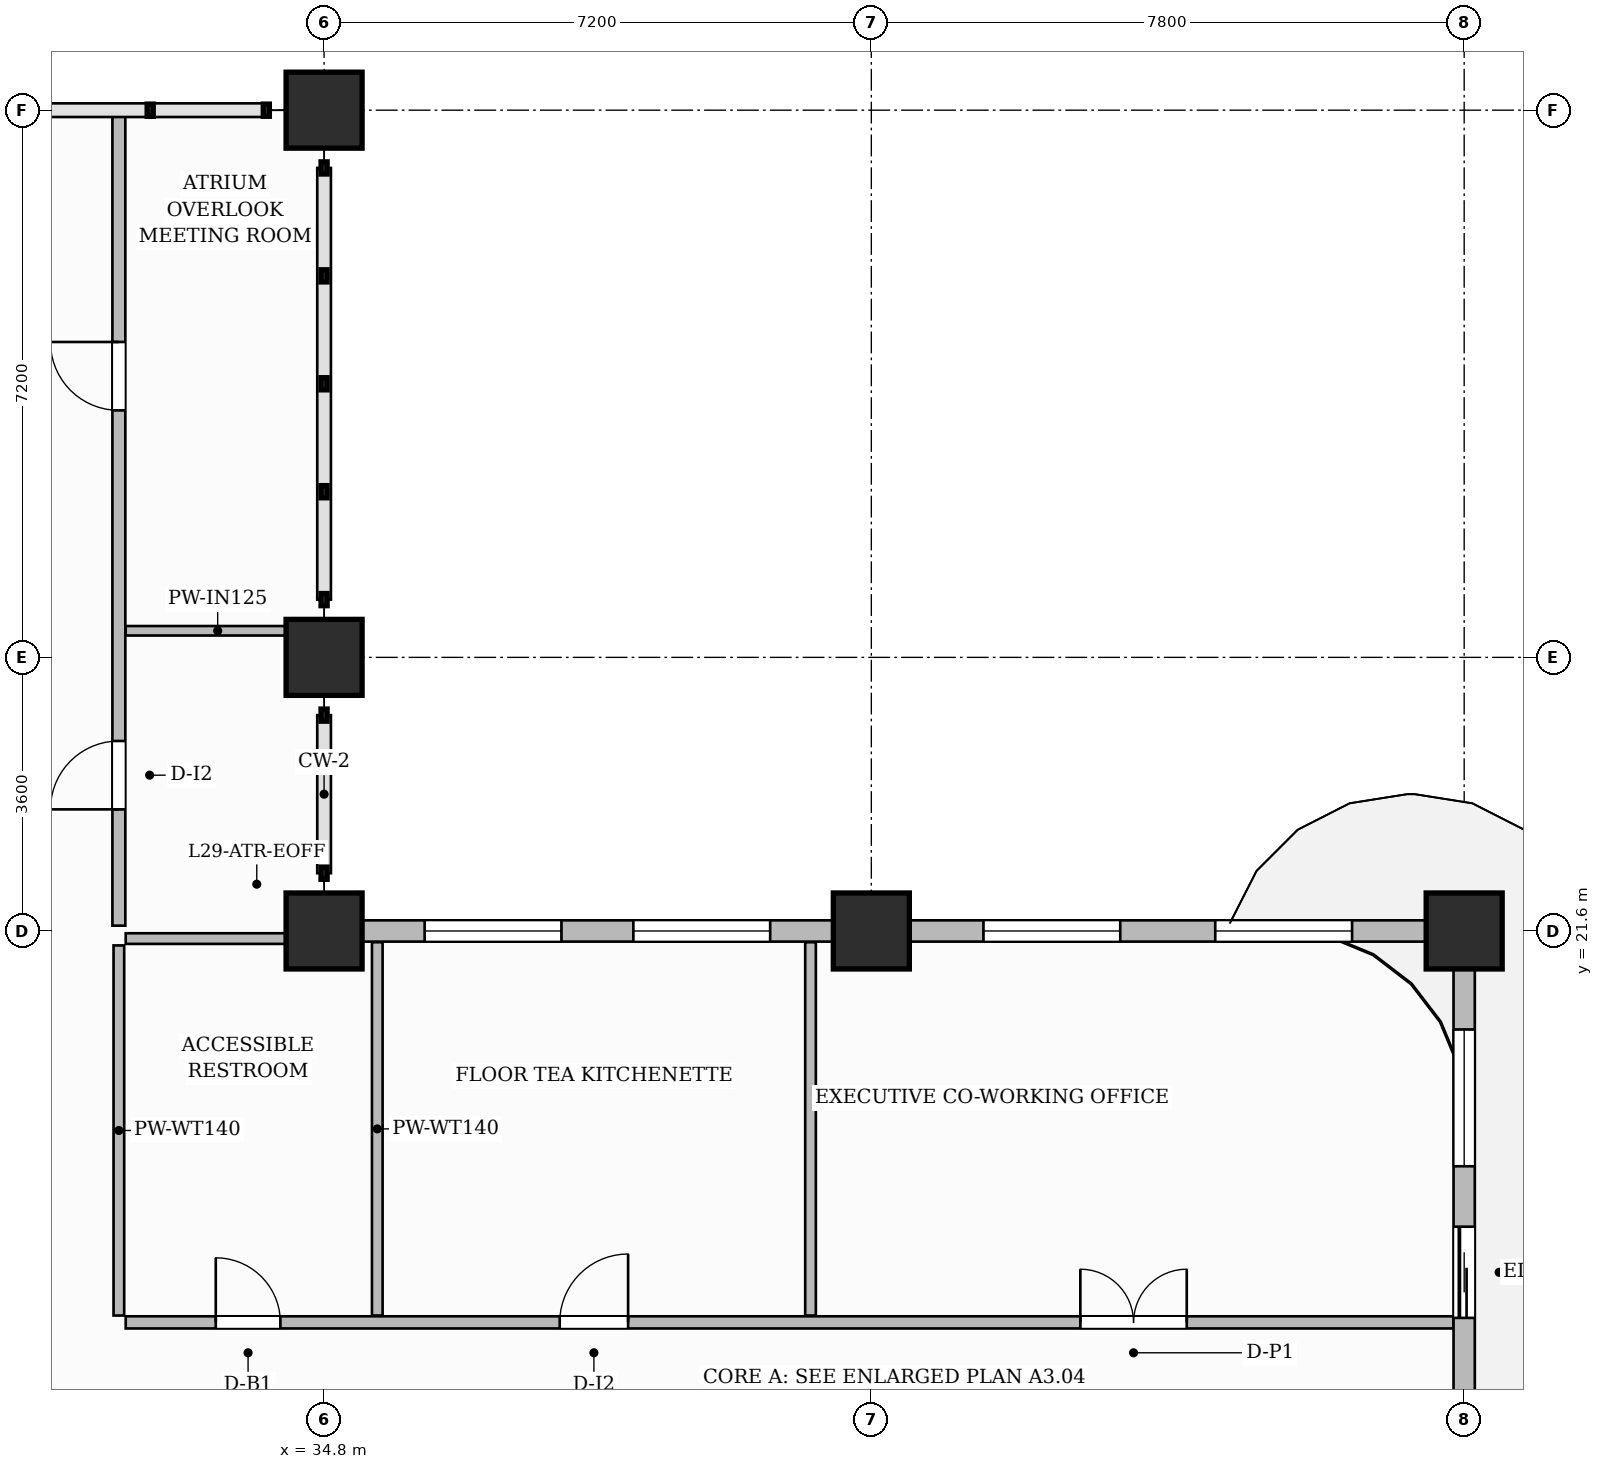
"""IFC4 building model, lengths in metres.
Left out: names, types, materials, properties, quantities, classifications, styles, units other than length and angle.
Written with IfcOpenShell. Run it as: python <this file> out.ifc"""

import sys

from ifc_helpers import new_model, si_unit, direction, frame, frame_2d, origin, origin_2d, place, context, subcontext, project, spatial, rectangle, extrude, source, transform, mapped, element, fill, save


model = new_model("IFC4")
c1 = context("Model", 3, precision=1e-05, world=origin(), true_north=direction((0.0, 1.0)))
c2 = subcontext(c1, "Body", "Model", "MODEL_VIEW")
j1 = project(units=[si_unit("LENGTHUNIT", "METRE"), si_unit("PLANEANGLEUNIT", "RADIAN")], contexts=[c1])
p1 = place(None, origin())
s1 = spatial("IfcSite", under=j1, at=p1, CompositionType="ELEMENT")
p2 = place(p1, origin())
s2 = spatial("IfcBuilding", under=s1, at=p2, CompositionType="ELEMENT")
p3 = place(p2, frame((0.0, 0.0, 119.2)))
s3 = spatial("IfcBuildingStorey", under=s2, at=p3, CompositionType="ELEMENT", Elevation=119.2)
m1 = source(origin(), c2, "Body", "SweptSolid", [
    extrude(rectangle(XDim=1.0, YDim=1.0, at=origin_2d()), origin(), (0.0, 0.0, 1.0), 3.7),
])
for number, where, z_axis, x_axis in (
    (1, (34.8, 21.6, 0.0), (0.0, 0.0, 1.0), (1.0, 0.0, 0.0)),
    (2, (34.8, 25.2, 0.0), (0.0, 0.0, 1.0), (1.0, 0.0, 0.0)),
    (3, (34.8, 32.4, 0.0), (0.0, 0.0, 1.0), (1.0, 0.0, 0.0)),
    (4, (42.0, 21.6, 0.0), (0.0, 0.0, 1.0), (1.0, 0.0, 0.0)),
    (5, (49.8, 21.6, 0.0), (0.0, 0.0, 1.0), (1.0, 0.0, 0.0)),
):
    element("IfcColumn", number, at=place(p3, frame(where, z_axis=z_axis, x_axis=x_axis)), inside=s3, PredefinedType="COLUMN", context=c2, shape_type="MappedRepresentation", body=[
        mapped(m1, transform((0.0, 0.0, 0.0), scale=1.0)),
    ])
p4 = place(p3, frame((32.19, 16.45, 0.0), z_axis=(0.0, 0.0, 1.0), x_axis=(1.0, 0.0, 0.0)))
e6 = element("IfcWall", 6, at=p4, inside=s3, PredefinedType="PARTITIONING", context=c2, shape_type="SweptSolid", body=[
    extrude(rectangle(XDim=17.47, YDim=0.16, at=frame_2d((8.735, 0.0))), origin(), (0.0, 0.0, 1.0), 3.45),
])
p5 = place(p4, frame((1.185, 0.0, 0.0)))
e7 = element("IfcOpeningElement", 7, at=p5, cuts=e6, PredefinedType="OPENING", context=c2, shape_type="SweptSolid", body=[
    extrude(rectangle(XDim=0.85, YDim=2.1, at=frame_2d((0.425, 1.05))), frame((0.0, 0.09, 0.0), z_axis=(0.0, -1.0, 0.0), x_axis=(1.0, 0.0, 0.0)), (0.0, 0.0, 1.0), 0.18),
])
p6 = place(p4, frame((5.71, 0.0, 0.0)))
e8 = element("IfcOpeningElement", 8, at=p6, cuts=e6, PredefinedType="OPENING", context=c2, shape_type="SweptSolid", body=[
    extrude(rectangle(XDim=0.9, YDim=2.15, at=frame_2d((0.45, 1.075))), frame((0.0, 0.09, 0.0), z_axis=(0.0, -1.0, 0.0), x_axis=(1.0, 0.0, 0.0)), (0.0, 0.0, 1.0), 0.18),
])
p7 = place(p4, frame((12.56, 0.0, 0.0)))
e9 = element("IfcOpeningElement", 9, at=p7, cuts=e6, PredefinedType="OPENING", context=c2, shape_type="SweptSolid", body=[
    extrude(rectangle(XDim=1.4, YDim=2.35, at=frame_2d((0.7, 1.175))), frame((0.0, 0.09, 0.0), z_axis=(0.0, -1.0, 0.0), x_axis=(1.0, 0.0, 0.0)), (0.0, 0.0, 1.0), 0.18),
])
p8 = place(p3, frame((32.1, 16.54, 0.0), z_axis=(0.0, 0.0, 1.0), x_axis=(0.0, 1.0, 0.0)))
e10 = element("IfcWall", 10, at=p8, inside=s3, PredefinedType="PARTITIONING", context=c2, shape_type="SweptSolid", body=[
    extrude(rectangle(XDim=4.87, YDim=0.14, at=frame_2d((2.435, 0.0))), origin(), (0.0, 0.0, 1.0), 3.45),
])
for number, where, z_axis, x_axis in (
    (11, (35.5, 16.54, 0.0), (0.0, 0.0, 1.0), (0.0, 1.0, 0.0)),
    (12, (41.2, 16.54, 0.0), (0.0, 0.0, 1.0), (0.0, 1.0, 0.0)),
):
    element("IfcWall", number, at=place(p3, frame(where, z_axis=z_axis, x_axis=x_axis)), inside=s3, PredefinedType="PARTITIONING", context=c2, shape_type="SweptSolid", body=[
        extrude(rectangle(XDim=4.912, YDim=0.14, at=frame_2d((2.456, 0.0))), origin(), (0.0, 0.0, 1.0), 3.45),
    ])
p9 = place(p3, frame((32.19, 21.5, 0.0), z_axis=(0.0, 0.0, 1.0), x_axis=(1.0, 0.0, 0.0)))
e13 = element("IfcWall", 13, at=p9, inside=s3, PredefinedType="PARTITIONING", context=c2, shape_type="SweptSolid", body=[
    extrude(rectangle(XDim=2.42, YDim=0.14, at=frame_2d((1.21, 0.0))), origin(), (0.0, 0.0, 1.0), 2.935),
])
p10 = place(p3, frame((32.1, 21.67, 0.0), z_axis=(0.0, 0.0, 1.0), x_axis=(0.0, 1.0, 0.0)))
e14 = element("IfcWall", 14, at=p10, inside=s3, PredefinedType="PARTITIONING", context=c2, shape_type="SweptSolid", body=[
    extrude(rectangle(XDim=10.702, YDim=0.17, at=frame_2d((5.351, 0.0))), origin(), (0.0, 0.0, 1.0), 3.45),
])
p11 = place(p10, frame((1.53, 0.0, 0.0)))
e15 = element("IfcOpeningElement", 15, at=p11, cuts=e14, PredefinedType="OPENING", context=c2, shape_type="SweptSolid", body=[
    extrude(rectangle(XDim=0.9, YDim=2.15, at=frame_2d((0.45, 1.075))), frame((0.0, 0.095, 0.0), z_axis=(0.0, -1.0, 0.0), x_axis=(1.0, 0.0, 0.0)), (0.0, 0.0, 1.0), 0.19),
])
p12 = place(p10, frame((6.78, 0.0, 0.0)))
e16 = element("IfcOpeningElement", 16, at=p12, cuts=e14, PredefinedType="OPENING", context=c2, shape_type="SweptSolid", body=[
    extrude(rectangle(XDim=0.9, YDim=2.15, at=frame_2d((0.45, 1.075))), frame((0.0, 0.095, 0.0), z_axis=(0.0, -1.0, 0.0), x_axis=(1.0, 0.0, 0.0)), (0.0, 0.0, 1.0), 0.19),
])
p13 = place(p3, frame((32.19, 25.55, 0.0), z_axis=(0.0, 0.0, 1.0), x_axis=(1.0, 0.0, 0.0)))
e17 = element("IfcWall", 17, at=p13, inside=s3, PredefinedType="PARTITIONING", context=c2, shape_type="SweptSolid", body=[
    extrude(rectangle(XDim=2.42, YDim=0.125, at=frame_2d((1.21, 0.0))), origin(), (0.0, 0.0, 1.0), 3.45),
])
p14 = place(p3, frame((49.8, 14.62, 0.0), z_axis=(0.0, 0.0, 1.0), x_axis=(0.0, 1.0, 0.0)))
e18 = element("IfcWall", 18, at=p14, inside=s3, PredefinedType="SOLIDWALL", context=c2, shape_type="SweptSolid", body=[
    extrude(rectangle(XDim=6.93, YDim=0.28, at=frame_2d((3.465, 0.0))), origin(), (0.0, 0.0, 1.0), 2.935),
])
p15 = place(p14, frame((1.889, 0.0, 0.0)))
e19 = element("IfcOpeningElement", 19, at=p15, cuts=e18, PredefinedType="OPENING", context=c2, shape_type="SweptSolid", body=[
    extrude(rectangle(XDim=1.2, YDim=2.2, at=frame_2d((0.6, 1.1))), frame((0.0, 0.15, 0.0), z_axis=(0.0, -1.0, 0.0), x_axis=(1.0, 0.0, 0.0)), (0.0, 0.0, 1.0), 0.3),
])
p16 = place(p14, frame((3.884, 0.0, 0.8)))
e20 = element("IfcOpeningElement", 20, at=p16, cuts=e18, PredefinedType="OPENING", context=c2, shape_type="SweptSolid", body=[
    extrude(rectangle(XDim=1.8, YDim=1.85, at=frame_2d((0.9, 0.925))), frame((0.0, 0.15, 0.0), z_axis=(0.0, -1.0, 0.0), x_axis=(1.0, 0.0, 0.0)), (0.0, 0.0, 1.0), 0.3),
])
p17 = place(p3, frame((34.8, 21.6, 0.0), z_axis=(0.0, 0.0, 1.0), x_axis=(1.0, 0.0, 0.0)))
e21 = element("IfcWall", 21, at=p17, inside=s3, PredefinedType="SOLIDWALL", context=c2, shape_type="SweptSolid", body=[
    extrude(rectangle(XDim=15.0, YDim=0.28, at=frame_2d((7.5, 0.0))), origin(), (0.0, 0.0, 1.0), 2.935),
])
p18 = place(p17, frame((1.323, 0.0, 0.8)))
e22 = element("IfcOpeningElement", 22, at=p18, cuts=e21, PredefinedType="OPENING", context=c2, shape_type="SweptSolid", body=[
    extrude(rectangle(XDim=1.8, YDim=1.85, at=frame_2d((0.9, 0.925))), frame((0.0, 0.15, 0.0), z_axis=(0.0, -1.0, 0.0), x_axis=(1.0, 0.0, 0.0)), (0.0, 0.0, 1.0), 0.3),
])
p19 = place(p17, frame((4.069, 0.0, 0.8)))
e23 = element("IfcOpeningElement", 23, at=p19, cuts=e21, PredefinedType="OPENING", context=c2, shape_type="SweptSolid", body=[
    extrude(rectangle(XDim=1.8, YDim=1.85, at=frame_2d((0.9, 0.925))), frame((0.0, 0.15, 0.0), z_axis=(0.0, -1.0, 0.0), x_axis=(1.0, 0.0, 0.0)), (0.0, 0.0, 1.0), 0.3),
])
p20 = place(p17, frame((8.675, 0.0, 0.8)))
e24 = element("IfcOpeningElement", 24, at=p20, cuts=e21, PredefinedType="OPENING", context=c2, shape_type="SweptSolid", body=[
    extrude(rectangle(XDim=1.8, YDim=1.85, at=frame_2d((0.9, 0.925))), frame((0.0, 0.15, 0.0), z_axis=(0.0, -1.0, 0.0), x_axis=(1.0, 0.0, 0.0)), (0.0, 0.0, 1.0), 0.3),
])
p21 = place(p17, frame((11.725, 0.0, 0.8)))
e25 = element("IfcOpeningElement", 25, at=p21, cuts=e21, PredefinedType="OPENING", context=c2, shape_type="SweptSolid", body=[
    extrude(rectangle(XDim=1.8, YDim=1.85, at=frame_2d((0.9, 0.925))), frame((0.0, 0.15, 0.0), z_axis=(0.0, -1.0, 0.0), x_axis=(1.0, 0.0, 0.0)), (0.0, 0.0, 1.0), 0.3),
])
m2 = source(origin(), c2, "Body", "SweptSolid", [
    extrude(rectangle(XDim=0.85, YDim=2.1, at=frame_2d((0.425, 1.05))), frame((0.0, 0.025, 0.0), z_axis=(0.0, -1.0, 0.0), x_axis=(1.0, 0.0, 0.0)), (0.0, 0.0, 1.0), 0.05),
])
p22 = place(p5, origin())
e26 = element("IfcDoor", 26, at=p22, inside=s3, OperationType="SINGLE_SWING_LEFT", PredefinedType="DOOR", context=c2, shape_type="MappedRepresentation", body=[
    mapped(m2, transform((0.0, 0.0, 0.0), scale=1.0)),
])
fill(e7, e26)
m3 = source(origin(), c2, "Body", "SweptSolid", [
    extrude(rectangle(XDim=0.9, YDim=2.15, at=frame_2d((0.45, 1.075))), frame((0.0, 0.025, 0.0), z_axis=(0.0, -1.0, 0.0), x_axis=(1.0, 0.0, 0.0)), (0.0, 0.0, 1.0), 0.05),
])
p23 = place(p6, origin())
e27 = element("IfcDoor", 27, at=p23, inside=s3, OperationType="SINGLE_SWING_RIGHT", PredefinedType="DOOR", context=c2, shape_type="MappedRepresentation", body=[
    mapped(m3, transform((0.0, 0.0, 0.0), scale=1.0)),
])
fill(e8, e27)
m4 = source(origin(), c2, "Body", "SweptSolid", [
    extrude(rectangle(XDim=1.4, YDim=2.35, at=frame_2d((0.7, 1.175))), frame((0.0, 0.025, 0.0), z_axis=(0.0, -1.0, 0.0), x_axis=(1.0, 0.0, 0.0)), (0.0, 0.0, 1.0), 0.05),
])
p24 = place(p7, origin())
e28 = element("IfcDoor", 28, at=p24, inside=s3, OperationType="DOUBLE_DOOR_SINGLE_SWING", PredefinedType="DOOR", context=c2, shape_type="MappedRepresentation", body=[
    mapped(m4, transform((0.0, 0.0, 0.0), scale=1.0)),
])
fill(e9, e28)
p25 = place(p11, origin())
e29 = element("IfcDoor", 29, at=p25, inside=s3, OperationType="SINGLE_SWING_LEFT", PredefinedType="DOOR", context=c2, shape_type="MappedRepresentation", body=[
    mapped(m3, transform((0.0, 0.0, 0.0), scale=1.0)),
])
fill(e15, e29)
p26 = place(p12, origin())
e30 = element("IfcDoor", 30, at=p26, inside=s3, OperationType="SINGLE_SWING_RIGHT", PredefinedType="DOOR", context=c2, shape_type="MappedRepresentation", body=[
    mapped(m3, transform((0.0, 0.0, 0.0), scale=1.0)),
])
fill(e16, e30)
m5 = source(origin(), c2, "Body", "SweptSolid", [
    extrude(rectangle(XDim=1.2, YDim=2.2, at=frame_2d((0.6, 1.1))), frame((0.0, 0.025, 0.0), z_axis=(0.0, -1.0, 0.0), x_axis=(1.0, 0.0, 0.0)), (0.0, 0.0, 1.0), 0.05),
])
p27 = place(p15, origin())
e31 = element("IfcDoor", 31, at=p27, inside=s3, OperationType="SLIDING_TO_LEFT", PredefinedType="DOOR", context=c2, shape_type="MappedRepresentation", body=[
    mapped(m5, transform((0.0, 0.0, 0.0), scale=1.0)),
])
fill(e19, e31)
m6 = source(origin(), c2, "Body", "SweptSolid", [
    extrude(rectangle(XDim=1.8, YDim=1.85, at=frame_2d((0.9, 0.925))), frame((0.0, 0.03, 0.0), z_axis=(0.0, -1.0, 0.0), x_axis=(1.0, 0.0, 0.0)), (0.0, 0.0, 1.0), 0.06),
])
p28 = place(p16, origin())
e32 = element("IfcWindow", 32, at=p28, inside=s3, PartitioningType="DOUBLE_PANEL_VERTICAL", PredefinedType="WINDOW", context=c2, shape_type="MappedRepresentation", body=[
    mapped(m6, transform((0.0, 0.0, 0.0), scale=1.0)),
])
fill(e20, e32)
p29 = place(p18, origin())
e33 = element("IfcWindow", 33, at=p29, inside=s3, PartitioningType="DOUBLE_PANEL_VERTICAL", PredefinedType="WINDOW", context=c2, shape_type="MappedRepresentation", body=[
    mapped(m6, transform((0.0, 0.0, 0.0), scale=1.0)),
])
fill(e22, e33)
p30 = place(p19, origin())
e34 = element("IfcWindow", 34, at=p30, inside=s3, PartitioningType="DOUBLE_PANEL_VERTICAL", PredefinedType="WINDOW", context=c2, shape_type="MappedRepresentation", body=[
    mapped(m6, transform((0.0, 0.0, 0.0), scale=1.0)),
])
fill(e23, e34)
p31 = place(p20, origin())
e35 = element("IfcWindow", 35, at=p31, inside=s3, PartitioningType="DOUBLE_PANEL_VERTICAL", PredefinedType="WINDOW", context=c2, shape_type="MappedRepresentation", body=[
    mapped(m6, transform((0.0, 0.0, 0.0), scale=1.0)),
])
fill(e24, e35)
p32 = place(p21, origin())
e36 = element("IfcWindow", 36, at=p32, inside=s3, PartitioningType="DOUBLE_PANEL_VERTICAL", PredefinedType="WINDOW", context=c2, shape_type="MappedRepresentation", body=[
    mapped(m6, transform((0.0, 0.0, 0.0), scale=1.0)),
])
fill(e25, e36)
save(model, sys.argv[1])
